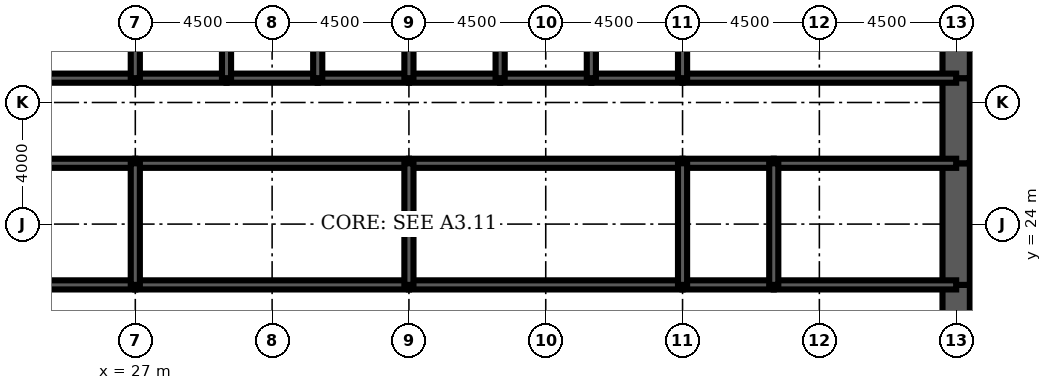
"""IFC4 building model, lengths in metres.
Left out: names, types, materials, properties, quantities, classifications, styles, units other than length and angle.
Written with IfcOpenShell. Run it as: python <this file> out.ifc"""

import sys

from ifc_helpers import new_model, si_unit, direction, frame, frame_2d, origin, place, context, subcontext, project, spatial, rectangle, extrude, element, fill, save


model = new_model("IFC4")
c1 = context("Model", 3, precision=1e-05, world=origin(), true_north=direction((0.0, 1.0)))
c2 = subcontext(c1, "Body", "Model", "MODEL_VIEW")
j1 = project(units=[si_unit("LENGTHUNIT", "METRE"), si_unit("PLANEANGLEUNIT", "RADIAN")], contexts=[c1])
p1 = place(None, origin())
s1 = spatial("IfcSite", under=j1, at=p1, CompositionType="ELEMENT")
p2 = place(p1, origin())
s2 = spatial("IfcBuilding", under=s1, at=p2, CompositionType="ELEMENT")
p3 = place(p2, frame((0.0, 0.0, 45.5)))
s3 = spatial("IfcBuildingStorey", under=s2, at=p3, CompositionType="ELEMENT", Elevation=45.5)
p4 = place(p3, frame((54.0, 19.2, 0.0), z_axis=(0.0, 0.0, 1.0), x_axis=(0.0, 1.0, 0.0)))
e1 = element("IfcWall", 1, at=p4, inside=s3, PredefinedType="SHEAR", context=c2, shape_type="SweptSolid", body=[
    extrude(rectangle(XDim=2.8, YDim=0.9, at=frame_2d((1.4, 0.0))), origin(), (0.0, 0.0, 1.0), 4.5),
])
p5 = place(p4, frame((0.4, 0.0, 0.0)))
e2 = element("IfcOpeningElement", 2, at=p5, cuts=e1, PredefinedType="OPENING", context=c2, shape_type="SweptSolid", body=[
    extrude(rectangle(XDim=1.8, YDim=2.1, at=frame_2d((0.9, 1.05))), frame((0.0, 0.46, 0.0), z_axis=(0.0, -1.0, 0.0), x_axis=(1.0, 0.0, 0.0)), (0.0, 0.0, 1.0), 0.92),
])
p6 = place(p3, frame((54.0, 22.0, 0.0), z_axis=(0.0, 0.0, 1.0), x_axis=(0.0, 1.0, 0.0)))
e3 = element("IfcWall", 3, at=p6, inside=s3, PredefinedType="SHEAR", context=c2, shape_type="SweptSolid", body=[
    extrude(rectangle(XDim=4.0, YDim=0.9, at=frame_2d((2.0, 0.0))), origin(), (0.0, 0.0, 1.0), 4.5),
])
p7 = place(p3, frame((54.0, 26.0, 0.0), z_axis=(0.0, 0.0, 1.0), x_axis=(0.0, 1.0, 0.0)))
e4 = element("IfcWall", 4, at=p7, inside=s3, PredefinedType="SHEAR", context=c2, shape_type="SweptSolid", body=[
    extrude(rectangle(XDim=2.8, YDim=0.9, at=frame_2d((1.4, 0.0))), origin(), (0.0, 0.0, 1.0), 4.5),
])
p8 = place(p7, frame((0.6, 0.0, 0.0)))
e5 = element("IfcOpeningElement", 5, at=p8, cuts=e4, PredefinedType="OPENING", context=c2, shape_type="SweptSolid", body=[
    extrude(rectangle(XDim=1.8, YDim=2.1, at=frame_2d((0.9, 1.05))), frame((0.0, 0.46, 0.0), z_axis=(0.0, -1.0, 0.0), x_axis=(1.0, 0.0, 0.0)), (0.0, 0.0, 1.0), 0.92),
])
p9 = place(p3, frame((54.0, 28.8, 0.0), z_axis=(0.0, 0.0, 1.0), x_axis=(0.0, 1.0, 0.0)))
e6 = element("IfcWall", 6, at=p9, inside=s3, PredefinedType="SHEAR", context=c2, shape_type="SweptSolid", body=[
    extrude(rectangle(XDim=3.2, YDim=0.9, at=frame_2d((1.6, 0.0))), origin(), (0.0, 0.0, 1.0), 4.5),
])
p10 = place(p3, frame((18.0, 28.8, 0.0), z_axis=(0.0, 0.0, 1.0), x_axis=(1.0, 0.0, 0.0)))
e7 = element("IfcWall", 7, at=p10, inside=s3, PredefinedType="SOLIDWALL", context=c2, shape_type="SweptSolid", body=[
    extrude(rectangle(XDim=9.0, YDim=0.3, at=frame_2d((4.5, 0.0))), origin(), (0.0, 0.0, 1.0), 4.5),
])
p11 = place(p10, frame((0.65, 0.0, 0.0)))
e8 = element("IfcOpeningElement", 8, at=p11, cuts=e7, PredefinedType="OPENING", context=c2, shape_type="SweptSolid", body=[
    extrude(rectangle(XDim=1.0, YDim=2.1, at=frame_2d((0.5, 1.05))), frame((0.0, 0.16, 0.0), z_axis=(0.0, -1.0, 0.0), x_axis=(1.0, 0.0, 0.0)), (0.0, 0.0, 1.0), 0.32),
])
p12 = place(p3, frame((27.0, 28.8, 0.0), z_axis=(0.0, 0.0, 1.0), x_axis=(1.0, 0.0, 0.0)))
e9 = element("IfcWall", 9, at=p12, inside=s3, PredefinedType="SOLIDWALL", context=c2, shape_type="SweptSolid", body=[
    extrude(rectangle(XDim=3.0, YDim=0.3, at=frame_2d((1.5, 0.0))), origin(), (0.0, 0.0, 1.0), 4.5),
])
p13 = place(p12, frame((0.95, 0.0, 0.0)))
e10 = element("IfcOpeningElement", 10, at=p13, cuts=e9, PredefinedType="OPENING", context=c2, shape_type="SweptSolid", body=[
    extrude(rectangle(XDim=1.1, YDim=2.2, at=frame_2d((0.55, 1.1))), frame((0.0, 0.16, 0.0), z_axis=(0.0, -1.0, 0.0), x_axis=(1.0, 0.0, 0.0)), (0.0, 0.0, 1.0), 0.32),
])
p14 = place(p3, frame((30.0, 28.8, 0.0), z_axis=(0.0, 0.0, 1.0), x_axis=(1.0, 0.0, 0.0)))
e11 = element("IfcWall", 11, at=p14, inside=s3, PredefinedType="SOLIDWALL", context=c2, shape_type="SweptSolid", body=[
    extrude(rectangle(XDim=3.0, YDim=0.3, at=frame_2d((1.5, 0.0))), origin(), (0.0, 0.0, 1.0), 4.5),
])
p15 = place(p14, frame((0.95, 0.0, 0.0)))
e12 = element("IfcOpeningElement", 12, at=p15, cuts=e11, PredefinedType="OPENING", context=c2, shape_type="SweptSolid", body=[
    extrude(rectangle(XDim=1.1, YDim=2.2, at=frame_2d((0.55, 1.1))), frame((0.0, 0.16, 0.0), z_axis=(0.0, -1.0, 0.0), x_axis=(1.0, 0.0, 0.0)), (0.0, 0.0, 1.0), 0.32),
])
p16 = place(p3, frame((33.0, 28.8, 0.0), z_axis=(0.0, 0.0, 1.0), x_axis=(1.0, 0.0, 0.0)))
e13 = element("IfcWall", 13, at=p16, inside=s3, PredefinedType="SOLIDWALL", context=c2, shape_type="SweptSolid", body=[
    extrude(rectangle(XDim=3.0, YDim=0.3, at=frame_2d((1.5, 0.0))), origin(), (0.0, 0.0, 1.0), 4.5),
])
p17 = place(p16, frame((0.95, 0.0, 0.0)))
e14 = element("IfcOpeningElement", 14, at=p17, cuts=e13, PredefinedType="OPENING", context=c2, shape_type="SweptSolid", body=[
    extrude(rectangle(XDim=1.1, YDim=2.2, at=frame_2d((0.55, 1.1))), frame((0.0, 0.16, 0.0), z_axis=(0.0, -1.0, 0.0), x_axis=(1.0, 0.0, 0.0)), (0.0, 0.0, 1.0), 0.32),
])
for number, where, z_axis, x_axis in (
    (15, (36.0, 28.8, 0.0), (0.0, 0.0, 1.0), (1.0, 0.0, 0.0)),
    (16, (39.0, 28.8, 0.0), (0.0, 0.0, 1.0), (1.0, 0.0, 0.0)),
):
    element("IfcWall", number, at=place(p3, frame(where, z_axis=z_axis, x_axis=x_axis)), inside=s3, PredefinedType="SOLIDWALL", context=c2, shape_type="SweptSolid", body=[
        extrude(rectangle(XDim=3.0, YDim=0.3, at=frame_2d((1.5, 0.0))), origin(), (0.0, 0.0, 1.0), 4.5),
    ])
p18 = place(p3, frame((42.0, 28.8, 0.0), z_axis=(0.0, 0.0, 1.0), x_axis=(1.0, 0.0, 0.0)))
e17 = element("IfcWall", 17, at=p18, inside=s3, PredefinedType="SOLIDWALL", context=c2, shape_type="SweptSolid", body=[
    extrude(rectangle(XDim=3.0, YDim=0.3, at=frame_2d((1.5, 0.0))), origin(), (0.0, 0.0, 1.0), 4.5),
])
p19 = place(p18, frame((0.95, 0.0, 0.0)))
e18 = element("IfcOpeningElement", 18, at=p19, cuts=e17, PredefinedType="OPENING", context=c2, shape_type="SweptSolid", body=[
    extrude(rectangle(XDim=1.1, YDim=2.2, at=frame_2d((0.55, 1.1))), frame((0.0, 0.16, 0.0), z_axis=(0.0, -1.0, 0.0), x_axis=(1.0, 0.0, 0.0)), (0.0, 0.0, 1.0), 0.32),
])
p20 = place(p3, frame((45.0, 28.8, 0.0), z_axis=(0.0, 0.0, 1.0), x_axis=(1.0, 0.0, 0.0)))
e19 = element("IfcWall", 19, at=p20, inside=s3, PredefinedType="SOLIDWALL", context=c2, shape_type="SweptSolid", body=[
    extrude(rectangle(XDim=9.0, YDim=0.3, at=frame_2d((4.5, 0.0))), origin(), (0.0, 0.0, 1.0), 4.5),
])
p21 = place(p20, frame((7.35, 0.0, 0.0)))
e20 = element("IfcOpeningElement", 20, at=p21, cuts=e19, PredefinedType="OPENING", context=c2, shape_type="SweptSolid", body=[
    extrude(rectangle(XDim=1.0, YDim=2.1, at=frame_2d((0.5, 1.05))), frame((0.0, 0.16, 0.0), z_axis=(0.0, -1.0, 0.0), x_axis=(1.0, 0.0, 0.0)), (0.0, 0.0, 1.0), 0.32),
])
p22 = place(p3, frame((24.0, 22.0, 0.0), z_axis=(0.0, 0.0, 1.0), x_axis=(1.0, 0.0, 0.0)))
e21 = element("IfcWall", 21, at=p22, inside=s3, PredefinedType="SOLIDWALL", context=c2, shape_type="SweptSolid", body=[
    extrude(rectangle(XDim=3.0, YDim=0.3, at=frame_2d((1.5, 0.0))), origin(), (0.0, 0.0, 1.0), 4.5),
])
p23 = place(p22, frame((1.0, 0.0, 0.0)))
e22 = element("IfcOpeningElement", 22, at=p23, cuts=e21, PredefinedType="OPENING", context=c2, shape_type="SweptSolid", body=[
    extrude(rectangle(XDim=1.0, YDim=2.1, at=frame_2d((0.5, 1.05))), frame((0.0, 0.16, 0.0), z_axis=(0.0, -1.0, 0.0), x_axis=(1.0, 0.0, 0.0)), (0.0, 0.0, 1.0), 0.32),
])
p24 = place(p3, frame((27.0, 22.0, 0.0), z_axis=(0.0, 0.0, 1.0), x_axis=(1.0, 0.0, 0.0)))
e23 = element("IfcWall", 23, at=p24, inside=s3, PredefinedType="SOLIDWALL", context=c2, shape_type="SweptSolid", body=[
    extrude(rectangle(XDim=9.0, YDim=0.3, at=frame_2d((4.5, 0.0))), origin(), (0.0, 0.0, 1.0), 4.5),
])
p25 = place(p24, frame((4.0, 0.0, 0.0)))
e24 = element("IfcOpeningElement", 24, at=p25, cuts=e23, PredefinedType="OPENING", context=c2, shape_type="SweptSolid", body=[
    extrude(rectangle(XDim=1.0, YDim=2.1, at=frame_2d((0.5, 1.05))), frame((0.0, 0.16, 0.0), z_axis=(0.0, -1.0, 0.0), x_axis=(1.0, 0.0, 0.0)), (0.0, 0.0, 1.0), 0.32),
])
p26 = place(p3, frame((36.0, 22.0, 0.0), z_axis=(0.0, 0.0, 1.0), x_axis=(1.0, 0.0, 0.0)))
e25 = element("IfcWall", 25, at=p26, inside=s3, PredefinedType="SOLIDWALL", context=c2, shape_type="SweptSolid", body=[
    extrude(rectangle(XDim=9.0, YDim=0.3, at=frame_2d((4.5, 0.0))), origin(), (0.0, 0.0, 1.0), 4.5),
])
p27 = place(p26, frame((4.0, 0.0, 0.0)))
e26 = element("IfcOpeningElement", 26, at=p27, cuts=e25, PredefinedType="OPENING", context=c2, shape_type="SweptSolid", body=[
    extrude(rectangle(XDim=1.0, YDim=2.1, at=frame_2d((0.5, 1.05))), frame((0.0, 0.16, 0.0), z_axis=(0.0, -1.0, 0.0), x_axis=(1.0, 0.0, 0.0)), (0.0, 0.0, 1.0), 0.32),
])
p28 = place(p3, frame((45.0, 22.0, 0.0), z_axis=(0.0, 0.0, 1.0), x_axis=(1.0, 0.0, 0.0)))
e27 = element("IfcWall", 27, at=p28, inside=s3, PredefinedType="SOLIDWALL", context=c2, shape_type="SweptSolid", body=[
    extrude(rectangle(XDim=3.0, YDim=0.3, at=frame_2d((1.5, 0.0))), origin(), (0.0, 0.0, 1.0), 4.5),
])
p29 = place(p28, frame((1.0, 0.0, 0.0)))
e28 = element("IfcOpeningElement", 28, at=p29, cuts=e27, PredefinedType="OPENING", context=c2, shape_type="SweptSolid", body=[
    extrude(rectangle(XDim=1.0, YDim=2.1, at=frame_2d((0.5, 1.05))), frame((0.0, 0.16, 0.0), z_axis=(0.0, -1.0, 0.0), x_axis=(1.0, 0.0, 0.0)), (0.0, 0.0, 1.0), 0.32),
])
p30 = place(p3, frame((48.0, 22.0, 0.0), z_axis=(0.0, 0.0, 1.0), x_axis=(1.0, 0.0, 0.0)))
e29 = element("IfcWall", 29, at=p30, inside=s3, PredefinedType="SOLIDWALL", context=c2, shape_type="SweptSolid", body=[
    extrude(rectangle(XDim=6.0, YDim=0.3, at=frame_2d((3.0, 0.0))), origin(), (0.0, 0.0, 1.0), 4.5),
])
p31 = place(p30, frame((2.0, 0.0, 0.0)))
e30 = element("IfcOpeningElement", 30, at=p31, cuts=e29, PredefinedType="OPENING", context=c2, shape_type="SweptSolid", body=[
    extrude(rectangle(XDim=1.0, YDim=2.1, at=frame_2d((0.5, 1.05))), frame((0.0, 0.16, 0.0), z_axis=(0.0, -1.0, 0.0), x_axis=(1.0, 0.0, 0.0)), (0.0, 0.0, 1.0), 0.32),
])
p32 = place(p30, frame((4.0, 0.0, 0.0)))
e31 = element("IfcOpeningElement", 31, at=p32, cuts=e29, PredefinedType="OPENING", context=c2, shape_type="SweptSolid", body=[
    extrude(rectangle(XDim=1.0, YDim=2.1, at=frame_2d((0.5, 1.05))), frame((0.0, 0.16, 0.0), z_axis=(0.0, -1.0, 0.0), x_axis=(1.0, 0.0, 0.0)), (0.0, 0.0, 1.0), 0.32),
])
p33 = place(p3, frame((24.0, 26.0, 0.0), z_axis=(0.0, 0.0, 1.0), x_axis=(1.0, 0.0, 0.0)))
e32 = element("IfcWall", 32, at=p33, inside=s3, PredefinedType="SOLIDWALL", context=c2, shape_type="SweptSolid", body=[
    extrude(rectangle(XDim=3.0, YDim=0.3, at=frame_2d((1.5, 0.0))), origin(), (0.0, 0.0, 1.0), 4.5),
])
for number, where, z_axis, x_axis in (
    (33, (27.0, 26.0, 0.0), (0.0, 0.0, 1.0), (1.0, 0.0, 0.0)),
    (34, (36.0, 26.0, 0.0), (0.0, 0.0, 1.0), (1.0, 0.0, 0.0)),
):
    element("IfcWall", number, at=place(p3, frame(where, z_axis=z_axis, x_axis=x_axis)), inside=s3, PredefinedType="SOLIDWALL", context=c2, shape_type="SweptSolid", body=[
        extrude(rectangle(XDim=9.0, YDim=0.3, at=frame_2d((4.5, 0.0))), origin(), (0.0, 0.0, 1.0), 4.5),
    ])
p34 = place(p3, frame((45.0, 26.0, 0.0), z_axis=(0.0, 0.0, 1.0), x_axis=(1.0, 0.0, 0.0)))
e35 = element("IfcWall", 35, at=p34, inside=s3, PredefinedType="SOLIDWALL", context=c2, shape_type="SweptSolid", body=[
    extrude(rectangle(XDim=3.0, YDim=0.3, at=frame_2d((1.5, 0.0))), origin(), (0.0, 0.0, 1.0), 4.5),
])
p35 = place(p3, frame((48.0, 26.0, 0.0), z_axis=(0.0, 0.0, 1.0), x_axis=(1.0, 0.0, 0.0)))
e36 = element("IfcWall", 36, at=p35, inside=s3, PredefinedType="SOLIDWALL", context=c2, shape_type="SweptSolid", body=[
    extrude(rectangle(XDim=6.0, YDim=0.3, at=frame_2d((3.0, 0.0))), origin(), (0.0, 0.0, 1.0), 4.5),
])
for number, where, z_axis, x_axis in (
    (37, (27.0, 28.8, 0.0), (0.0, 0.0, 1.0), (0.0, 1.0, 0.0)),
    (38, (30.0, 28.8, 0.0), (0.0, 0.0, 1.0), (0.0, 1.0, 0.0)),
    (39, (33.0, 28.8, 0.0), (0.0, 0.0, 1.0), (0.0, 1.0, 0.0)),
    (40, (36.0, 28.8, 0.0), (0.0, 0.0, 1.0), (0.0, 1.0, 0.0)),
    (41, (39.0, 28.8, 0.0), (0.0, 0.0, 1.0), (0.0, 1.0, 0.0)),
    (42, (42.0, 28.8, 0.0), (0.0, 0.0, 1.0), (0.0, 1.0, 0.0)),
    (43, (45.0, 28.8, 0.0), (0.0, 0.0, 1.0), (0.0, 1.0, 0.0)),
):
    element("IfcWall", number, at=place(p3, frame(where, z_axis=z_axis, x_axis=x_axis)), inside=s3, PredefinedType="SOLIDWALL", context=c2, shape_type="SweptSolid", body=[
        extrude(rectangle(XDim=3.2, YDim=0.3, at=frame_2d((1.6, 0.0))), origin(), (0.0, 0.0, 1.0), 4.5),
    ])
for number, where, z_axis, x_axis in (
    (44, (27.0, 22.0, 0.0), (0.0, 0.0, 1.0), (0.0, 1.0, 0.0)),
    (45, (36.0, 22.0, 0.0), (0.0, 0.0, 1.0), (0.0, 1.0, 0.0)),
    (46, (45.0, 22.0, 0.0), (0.0, 0.0, 1.0), (0.0, 1.0, 0.0)),
    (47, (48.0, 22.0, 0.0), (0.0, 0.0, 1.0), (0.0, 1.0, 0.0)),
):
    element("IfcWall", number, at=place(p3, frame(where, z_axis=z_axis, x_axis=x_axis)), inside=s3, PredefinedType="SOLIDWALL", context=c2, shape_type="SweptSolid", body=[
        extrude(rectangle(XDim=4.0, YDim=0.3, at=frame_2d((2.0, 0.0))), origin(), (0.0, 0.0, 1.0), 4.5),
    ])
p36 = place(p3, frame((42.5, 22.15, 0.0), z_axis=(0.0, 0.0, 1.0), x_axis=(0.0, 1.0, 0.0)))
e48 = element("IfcWall", 48, at=p36, inside=s3, PredefinedType="PARTITIONING", context=c2, shape_type="SweptSolid", body=[
    extrude(rectangle(XDim=3.7, YDim=0.15, at=frame_2d((1.85, 0.0))), origin(), (0.0, 0.0, 1.0), 3.0),
])
p37 = place(p36, frame((2.2, 0.0, 0.0)))
e49 = element("IfcOpeningElement", 49, at=p37, cuts=e48, PredefinedType="OPENING", context=c2, shape_type="SweptSolid", body=[
    extrude(rectangle(XDim=1.0, YDim=2.1, at=frame_2d((0.5, 1.05))), frame((0.0, 0.085, 0.0), z_axis=(0.0, -1.0, 0.0), x_axis=(1.0, 0.0, 0.0)), (0.0, 0.0, 1.0), 0.17),
])
p38 = place(p3, frame((51.375, 22.15, 0.0), z_axis=(0.0, 0.0, 1.0), x_axis=(0.0, 1.0, 0.0)))
e50 = element("IfcWall", 50, at=p38, inside=s3, PredefinedType="PARTITIONING", context=c2, shape_type="SweptSolid", body=[
    extrude(rectangle(XDim=3.7, YDim=0.15, at=frame_2d((1.85, 0.0))), origin(), (0.0, 0.0, 1.0), 3.0),
])
p39 = place(p3, frame((25.2, 26.15, 0.0), z_axis=(0.0, 0.0, 1.0), x_axis=(0.0, 1.0, 0.0)))
e51 = element("IfcWall", 51, at=p39, inside=s3, PredefinedType="PARTITIONING", context=c2, shape_type="SweptSolid", body=[
    extrude(rectangle(XDim=2.5, YDim=0.15, at=frame_2d((1.25, 0.0))), origin(), (0.0, 0.0, 1.0), 3.0),
])
p40 = place(p39, frame((0.35, 0.0, 0.0)))
e52 = element("IfcOpeningElement", 52, at=p40, cuts=e51, PredefinedType="OPENING", context=c2, shape_type="SweptSolid", body=[
    extrude(rectangle(XDim=1.0, YDim=2.1, at=frame_2d((0.5, 1.05))), frame((0.0, 0.085, 0.0), z_axis=(0.0, -1.0, 0.0), x_axis=(1.0, 0.0, 0.0)), (0.0, 0.0, 1.0), 0.17),
])
p41 = place(p37, origin())
e53 = element("IfcDoor", 53, at=p41, inside=s3, OperationType="SINGLE_SWING_RIGHT", PredefinedType="DOOR", context=c2, shape_type="SweptSolid", body=[
    extrude(rectangle(XDim=1.0, YDim=2.1, at=frame_2d((0.5, 1.05))), frame((0.0, 0.025, 0.0), z_axis=(0.0, -1.0, 0.0), x_axis=(1.0, 0.0, 0.0)), (0.0, 0.0, 1.0), 0.05),
])
fill(e49, e53)
p42 = place(p40, origin())
e54 = element("IfcDoor", 54, at=p42, inside=s3, OperationType="SINGLE_SWING_LEFT", PredefinedType="DOOR", context=c2, shape_type="SweptSolid", body=[
    extrude(rectangle(XDim=1.0, YDim=2.1, at=frame_2d((0.5, 1.05))), frame((0.0, 0.025, 0.0), z_axis=(0.0, -1.0, 0.0), x_axis=(1.0, 0.0, 0.0)), (0.0, 0.0, 1.0), 0.05),
])
fill(e52, e54)
p43 = place(p19, origin())
e55 = element("IfcDoor", 55, at=p43, inside=s3, OperationType="DOUBLE_DOOR_SLIDING", PredefinedType="USERDEFINED", context=c2, shape_type="SweptSolid", body=[
    extrude(rectangle(XDim=1.1, YDim=2.2, at=frame_2d((0.55, 1.1))), frame((0.0, 0.025, 0.0), z_axis=(0.0, -1.0, 0.0), x_axis=(1.0, 0.0, 0.0)), (0.0, 0.0, 1.0), 0.05),
])
fill(e18, e55)
p44 = place(p13, origin())
e56 = element("IfcDoor", 56, at=p44, inside=s3, OperationType="DOUBLE_DOOR_SLIDING", PredefinedType="USERDEFINED", context=c2, shape_type="SweptSolid", body=[
    extrude(rectangle(XDim=1.1, YDim=2.2, at=frame_2d((0.55, 1.1))), frame((0.0, 0.025, 0.0), z_axis=(0.0, -1.0, 0.0), x_axis=(1.0, 0.0, 0.0)), (0.0, 0.0, 1.0), 0.05),
])
fill(e10, e56)
p45 = place(p15, origin())
e57 = element("IfcDoor", 57, at=p45, inside=s3, OperationType="DOUBLE_DOOR_SLIDING", PredefinedType="USERDEFINED", context=c2, shape_type="SweptSolid", body=[
    extrude(rectangle(XDim=1.1, YDim=2.2, at=frame_2d((0.55, 1.1))), frame((0.0, 0.025, 0.0), z_axis=(0.0, -1.0, 0.0), x_axis=(1.0, 0.0, 0.0)), (0.0, 0.0, 1.0), 0.05),
])
fill(e12, e57)
p46 = place(p17, origin())
e58 = element("IfcDoor", 58, at=p46, inside=s3, OperationType="DOUBLE_DOOR_SLIDING", PredefinedType="USERDEFINED", context=c2, shape_type="SweptSolid", body=[
    extrude(rectangle(XDim=1.1, YDim=2.2, at=frame_2d((0.55, 1.1))), frame((0.0, 0.025, 0.0), z_axis=(0.0, -1.0, 0.0), x_axis=(1.0, 0.0, 0.0)), (0.0, 0.0, 1.0), 0.05),
])
fill(e14, e58)
p47 = place(p21, origin())
e59 = element("IfcDoor", 59, at=p47, inside=s3, OperationType="SINGLE_SWING_RIGHT", PredefinedType="DOOR", context=c2, shape_type="SweptSolid", body=[
    extrude(rectangle(XDim=1.0, YDim=2.1, at=frame_2d((0.5, 1.05))), frame((0.0, 0.025, 0.0), z_axis=(0.0, -1.0, 0.0), x_axis=(1.0, 0.0, 0.0)), (0.0, 0.0, 1.0), 0.05),
])
fill(e20, e59)
p48 = place(p5, origin())
e60 = element("IfcDoor", 60, at=p48, inside=s3, OperationType="SINGLE_SWING_LEFT", PredefinedType="DOOR", context=c2, shape_type="SweptSolid", body=[
    extrude(rectangle(XDim=1.8, YDim=2.1, at=frame_2d((0.9, 1.05))), frame((0.0, 0.45, 0.0), z_axis=(0.0, -1.0, 0.0), x_axis=(1.0, 0.0, 0.0)), (0.0, 0.0, 1.0), 0.899),
])
fill(e2, e60)
p49 = place(p8, origin())
e61 = element("IfcDoor", 61, at=p49, inside=s3, OperationType="SINGLE_SWING_LEFT", PredefinedType="DOOR", context=c2, shape_type="SweptSolid", body=[
    extrude(rectangle(XDim=1.8, YDim=2.1, at=frame_2d((0.9, 1.05))), frame((0.0, 0.45, 0.0), z_axis=(0.0, -1.0, 0.0), x_axis=(1.0, 0.0, 0.0)), (0.0, 0.0, 1.0), 0.899),
])
fill(e5, e61)
p50 = place(p23, origin())
e62 = element("IfcDoor", 62, at=p50, inside=s3, OperationType="SINGLE_SWING_LEFT", PredefinedType="DOOR", context=c2, shape_type="SweptSolid", body=[
    extrude(rectangle(XDim=1.0, YDim=2.1, at=frame_2d((0.5, 1.05))), frame((0.0, 0.025, 0.0), z_axis=(0.0, -1.0, 0.0), x_axis=(1.0, 0.0, 0.0)), (0.0, 0.0, 1.0), 0.05),
])
fill(e22, e62)
p51 = place(p25, origin())
e63 = element("IfcDoor", 63, at=p51, inside=s3, OperationType="SINGLE_SWING_LEFT", PredefinedType="DOOR", context=c2, shape_type="SweptSolid", body=[
    extrude(rectangle(XDim=1.0, YDim=2.1, at=frame_2d((0.5, 1.05))), frame((0.0, 0.025, 0.0), z_axis=(0.0, -1.0, 0.0), x_axis=(1.0, 0.0, 0.0)), (0.0, 0.0, 1.0), 0.05),
])
fill(e24, e63)
p52 = place(p27, origin())
e64 = element("IfcDoor", 64, at=p52, inside=s3, OperationType="SINGLE_SWING_LEFT", PredefinedType="DOOR", context=c2, shape_type="SweptSolid", body=[
    extrude(rectangle(XDim=1.0, YDim=2.1, at=frame_2d((0.5, 1.05))), frame((0.0, 0.025, 0.0), z_axis=(0.0, -1.0, 0.0), x_axis=(1.0, 0.0, 0.0)), (0.0, 0.0, 1.0), 0.05),
])
fill(e26, e64)
p53 = place(p29, origin())
e65 = element("IfcDoor", 65, at=p53, inside=s3, OperationType="SINGLE_SWING_LEFT", PredefinedType="DOOR", context=c2, shape_type="SweptSolid", body=[
    extrude(rectangle(XDim=1.0, YDim=2.1, at=frame_2d((0.5, 1.05))), frame((0.0, 0.025, 0.0), z_axis=(0.0, -1.0, 0.0), x_axis=(1.0, 0.0, 0.0)), (0.0, 0.0, 1.0), 0.05),
])
fill(e28, e65)
p54 = place(p31, origin())
e66 = element("IfcDoor", 66, at=p54, inside=s3, OperationType="SINGLE_SWING_LEFT", PredefinedType="DOOR", context=c2, shape_type="SweptSolid", body=[
    extrude(rectangle(XDim=1.0, YDim=2.1, at=frame_2d((0.5, 1.05))), frame((0.0, 0.025, 0.0), z_axis=(0.0, -1.0, 0.0), x_axis=(1.0, 0.0, 0.0)), (0.0, 0.0, 1.0), 0.05),
])
fill(e30, e66)
p55 = place(p32, origin())
e67 = element("IfcDoor", 67, at=p55, inside=s3, OperationType="SINGLE_SWING_RIGHT", PredefinedType="DOOR", context=c2, shape_type="SweptSolid", body=[
    extrude(rectangle(XDim=1.0, YDim=2.1, at=frame_2d((0.5, 1.05))), frame((0.0, 0.025, 0.0), z_axis=(0.0, -1.0, 0.0), x_axis=(1.0, 0.0, 0.0)), (0.0, 0.0, 1.0), 0.05),
])
fill(e31, e67)
save(model, sys.argv[1])
